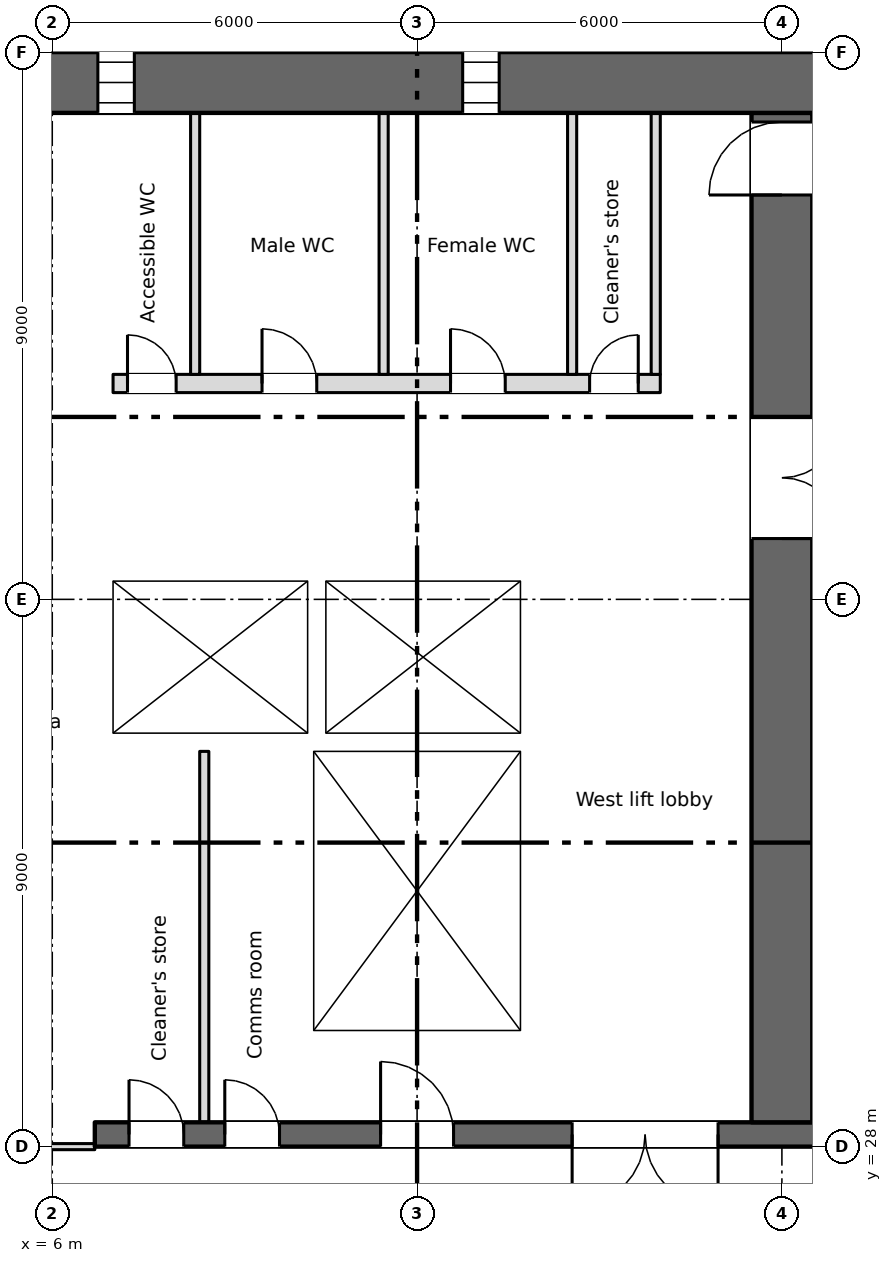
"""IFC4 building model, lengths in metres.
Left out: names, types, materials, properties, quantities, classifications, styles, units other than length and angle.
Written with IfcOpenShell. Run it as: python <this file> out.ifc"""

import sys

from ifc_helpers import new_model, si_unit, direction, frame, frame_2d, origin, place, context, subcontext, project, spatial, rectangle, extrude, element, fill, save


model = new_model("IFC4")
c1 = context("Model", 3, precision=1e-05, world=origin(), true_north=direction((0.0, 1.0)))
c2 = subcontext(c1, "Body", "Model", "MODEL_VIEW")
j1 = project(units=[si_unit("LENGTHUNIT", "METRE"), si_unit("PLANEANGLEUNIT", "RADIAN")], contexts=[c1])
p1 = place(None, origin())
s1 = spatial("IfcSite", under=j1, at=p1, CompositionType="ELEMENT")
p2 = place(p1, origin())
s2 = spatial("IfcBuilding", under=s1, at=p2, CompositionType="ELEMENT")
p3 = place(p2, frame((0.0, 0.0, 67.5)))
s3 = spatial("IfcBuildingStorey", under=s2, at=p3, CompositionType="ELEMENT", Elevation=67.5)
p4 = place(p3, frame((5.55, 45.5, 0.0), z_axis=(0.0, 0.0, 1.0), x_axis=(1.0, 0.0, 0.0)))
e1 = element("IfcWall", 1, at=p4, inside=s3, PredefinedType="SHEAR", context=c2, shape_type="SweptSolid", body=[
    extrude(rectangle(XDim=66.9, YDim=1.0, at=frame_2d((33.45, 0.0))), origin(), (0.0, 0.0, 1.0), 3.35),
])
p5 = place(p4, frame((1.2, 0.0, 0.6)))
e2 = element("IfcOpeningElement", 2, at=p5, cuts=e1, PredefinedType="OPENING", context=c2, shape_type="SweptSolid", body=[
    extrude(rectangle(XDim=0.6, YDim=2.4, at=frame_2d((0.3, 1.2))), frame((0.0, 0.51, 0.0), z_axis=(0.0, -1.0, 0.0), x_axis=(1.0, 0.0, 0.0)), (0.0, 0.0, 1.0), 1.02),
])
p6 = place(p4, frame((7.2, 0.0, 0.6)))
e3 = element("IfcOpeningElement", 3, at=p6, cuts=e1, PredefinedType="OPENING", context=c2, shape_type="SweptSolid", body=[
    extrude(rectangle(XDim=0.6, YDim=2.4, at=frame_2d((0.3, 1.2))), frame((0.0, 0.51, 0.0), z_axis=(0.0, -1.0, 0.0), x_axis=(1.0, 0.0, 0.0)), (0.0, 0.0, 1.0), 1.02),
])
p7 = place(p4, frame((61.2, 0.0, 0.6)))
e4 = element("IfcOpeningElement", 4, at=p7, cuts=e1, PredefinedType="OPENING", context=c2, shape_type="SweptSolid", body=[
    extrude(rectangle(XDim=0.6, YDim=2.4, at=frame_2d((0.3, 1.2))), frame((0.0, 0.51, 0.0), z_axis=(0.0, -1.0, 0.0), x_axis=(1.0, 0.0, 0.0)), (0.0, 0.0, 1.0), 1.02),
])
p8 = place(p3, frame((6.7, 28.2, 0.0), z_axis=(0.0, 0.0, 1.0), x_axis=(1.0, 0.0, 0.0)))
e5 = element("IfcWall", 5, at=p8, inside=s3, PredefinedType="SHEAR", context=c2, shape_type="SweptSolid", body=[
    extrude(rectangle(XDim=57.8, YDim=0.4, at=frame_2d((28.9, 0.0))), origin(), (0.0, 0.0, 1.0), 3.35),
])
p9 = place(p8, frame((12.562, 0.0, 0.0)))
e6 = element("IfcOpeningElement", 6, at=p9, cuts=e5, PredefinedType="OPENING", context=c2, shape_type="SweptSolid", body=[
    extrude(rectangle(XDim=0.9, YDim=2.1, at=frame_2d((0.45, 1.05))), frame((0.0, 0.21, 0.0), z_axis=(0.0, -1.0, 0.0), x_axis=(1.0, 0.0, 0.0)), (0.0, 0.0, 1.0), 0.42),
])
p10 = place(p8, frame((15.137, 0.0, 0.0)))
e7 = element("IfcOpeningElement", 7, at=p10, cuts=e5, PredefinedType="OPENING", context=c2, shape_type="SweptSolid", body=[
    extrude(rectangle(XDim=0.9, YDim=2.1, at=frame_2d((0.45, 1.05))), frame((0.0, 0.21, 0.0), z_axis=(0.0, -1.0, 0.0), x_axis=(1.0, 0.0, 0.0)), (0.0, 0.0, 1.0), 0.42),
])
p11 = place(p8, frame((49.85, 0.0, 0.0)))
e8 = element("IfcOpeningElement", 8, at=p11, cuts=e5, PredefinedType="OPENING", context=c2, shape_type="SweptSolid", body=[
    extrude(rectangle(XDim=0.9, YDim=2.1, at=frame_2d((0.45, 1.05))), frame((0.0, 0.21, 0.0), z_axis=(0.0, -1.0, 0.0), x_axis=(1.0, 0.0, 0.0)), (0.0, 0.0, 1.0), 0.42),
])
p12 = place(p8, frame((0.562, 0.0, 0.0)))
e9 = element("IfcOpeningElement", 9, at=p12, cuts=e5, PredefinedType="OPENING", context=c2, shape_type="SweptSolid", body=[
    extrude(rectangle(XDim=0.9, YDim=2.1, at=frame_2d((0.45, 1.05))), frame((0.0, 0.21, 0.0), z_axis=(0.0, -1.0, 0.0), x_axis=(1.0, 0.0, 0.0)), (0.0, 0.0, 1.0), 0.42),
])
p13 = place(p8, frame((2.137, 0.0, 0.0)))
e10 = element("IfcOpeningElement", 10, at=p13, cuts=e5, PredefinedType="OPENING", context=c2, shape_type="SweptSolid", body=[
    extrude(rectangle(XDim=0.9, YDim=2.1, at=frame_2d((0.45, 1.05))), frame((0.0, 0.21, 0.0), z_axis=(0.0, -1.0, 0.0), x_axis=(1.0, 0.0, 0.0)), (0.0, 0.0, 1.0), 0.42),
])
p14 = place(p8, frame((4.7, 0.0, 0.0)))
e11 = element("IfcOpeningElement", 11, at=p14, cuts=e5, PredefinedType="OPENING", context=c2, shape_type="SweptSolid", body=[
    extrude(rectangle(XDim=1.2, YDim=2.1, at=frame_2d((0.6, 1.05))), frame((0.0, 0.21, 0.0), z_axis=(0.0, -1.0, 0.0), x_axis=(1.0, 0.0, 0.0)), (0.0, 0.0, 1.0), 0.42),
])
p15 = place(p8, frame((31.7, 0.0, 0.0)))
e12 = element("IfcOpeningElement", 12, at=p15, cuts=e5, PredefinedType="OPENING", context=c2, shape_type="SweptSolid", body=[
    extrude(rectangle(XDim=1.2, YDim=2.1, at=frame_2d((0.6, 1.05))), frame((0.0, 0.21, 0.0), z_axis=(0.0, -1.0, 0.0), x_axis=(1.0, 0.0, 0.0)), (0.0, 0.0, 1.0), 0.42),
])
p16 = place(p8, frame((55.2, 0.0, 0.0)))
e13 = element("IfcOpeningElement", 13, at=p16, cuts=e5, PredefinedType="OPENING", context=c2, shape_type="SweptSolid", body=[
    extrude(rectangle(XDim=1.2, YDim=2.1, at=frame_2d((0.6, 1.05))), frame((0.0, 0.21, 0.0), z_axis=(0.0, -1.0, 0.0), x_axis=(1.0, 0.0, 0.0)), (0.0, 0.0, 1.0), 0.42),
])
p17 = place(p8, frame((21.7, 0.0, 0.0)))
e14 = element("IfcOpeningElement", 14, at=p17, cuts=e5, PredefinedType="OPENING", context=c2, shape_type="SweptSolid", body=[
    extrude(rectangle(XDim=1.2, YDim=2.1, at=frame_2d((0.6, 1.05))), frame((0.0, 0.21, 0.0), z_axis=(0.0, -1.0, 0.0), x_axis=(1.0, 0.0, 0.0)), (0.0, 0.0, 1.0), 0.42),
])
p18 = place(p8, frame((41.7, 0.0, 0.0)))
e15 = element("IfcOpeningElement", 15, at=p18, cuts=e5, PredefinedType="OPENING", context=c2, shape_type="SweptSolid", body=[
    extrude(rectangle(XDim=1.2, YDim=2.1, at=frame_2d((0.6, 1.05))), frame((0.0, 0.21, 0.0), z_axis=(0.0, -1.0, 0.0), x_axis=(1.0, 0.0, 0.0)), (0.0, 0.0, 1.0), 0.42),
])
p19 = place(p8, frame((24.85, 0.0, 0.0)))
e16 = element("IfcOpeningElement", 16, at=p19, cuts=e5, PredefinedType="OPENING", context=c2, shape_type="SweptSolid", body=[
    extrude(rectangle(XDim=2.4, YDim=2.1, at=frame_2d((1.2, 1.05))), frame((0.0, 0.21, 0.0), z_axis=(0.0, -1.0, 0.0), x_axis=(1.0, 0.0, 0.0)), (0.0, 0.0, 1.0), 0.42),
])
p20 = place(p8, frame((37.35, 0.0, 0.0)))
e17 = element("IfcOpeningElement", 17, at=p20, cuts=e5, PredefinedType="OPENING", context=c2, shape_type="SweptSolid", body=[
    extrude(rectangle(XDim=2.4, YDim=2.1, at=frame_2d((1.2, 1.05))), frame((0.0, 0.21, 0.0), z_axis=(0.0, -1.0, 0.0), x_axis=(1.0, 0.0, 0.0)), (0.0, 0.0, 1.0), 0.42),
])
p21 = place(p8, frame((7.85, 0.0, 0.0)))
e18 = element("IfcOpeningElement", 18, at=p21, cuts=e5, PredefinedType="OPENING", context=c2, shape_type="SweptSolid", body=[
    extrude(rectangle(XDim=2.4, YDim=2.1, at=frame_2d((1.2, 1.05))), frame((0.0, 0.21, 0.0), z_axis=(0.0, -1.0, 0.0), x_axis=(1.0, 0.0, 0.0)), (0.0, 0.0, 1.0), 0.42),
])
p22 = place(p8, frame((28.85, 0.0, 0.0)))
e19 = element("IfcOpeningElement", 19, at=p22, cuts=e5, PredefinedType="OPENING", context=c2, shape_type="SweptSolid", body=[
    extrude(rectangle(XDim=0.9, YDim=2.1, at=frame_2d((0.45, 1.05))), frame((0.0, 0.21, 0.0), z_axis=(0.0, -1.0, 0.0), x_axis=(1.0, 0.0, 0.0)), (0.0, 0.0, 1.0), 0.42),
])
p23 = place(p8, frame((34.85, 0.0, 0.0)))
e20 = element("IfcOpeningElement", 20, at=p23, cuts=e5, PredefinedType="OPENING", context=c2, shape_type="SweptSolid", body=[
    extrude(rectangle(XDim=0.9, YDim=2.1, at=frame_2d((0.45, 1.05))), frame((0.0, 0.21, 0.0), z_axis=(0.0, -1.0, 0.0), x_axis=(1.0, 0.0, 0.0)), (0.0, 0.0, 1.0), 0.42),
])
p24 = place(p3, frame((6.85, 28.4, 0.0), z_axis=(0.0, 0.0, 1.0), x_axis=(0.0, 1.0, 0.0)))
e21 = element("IfcWall", 21, at=p24, inside=s3, PredefinedType="SHEAR", context=c2, shape_type="SweptSolid", body=[
    extrude(rectangle(XDim=16.6, YDim=0.3, at=frame_2d((8.3, 0.0))), origin(), (0.0, 0.0, 1.0), 3.35),
])
p25 = place(p3, frame((18.0, 28.4, 0.0), z_axis=(0.0, 0.0, 1.0), x_axis=(0.0, 1.0, 0.0)))
e22 = element("IfcWall", 22, at=p25, inside=s3, PredefinedType="SHEAR", context=c2, shape_type="SweptSolid", body=[
    extrude(rectangle(XDim=16.6, YDim=1.0, at=frame_2d((8.3, 0.0))), origin(), (0.0, 0.0, 1.0), 3.35),
])
p26 = place(p25, frame((9.6, 0.0, 0.0)))
e23 = element("IfcOpeningElement", 23, at=p26, cuts=e22, PredefinedType="OPENING", context=c2, shape_type="SweptSolid", body=[
    extrude(rectangle(XDim=2.0, YDim=2.1, at=frame_2d((1.0, 1.05))), frame((0.0, 0.51, 0.0), z_axis=(0.0, -1.0, 0.0), x_axis=(1.0, 0.0, 0.0)), (0.0, 0.0, 1.0), 1.02),
])
p27 = place(p25, frame((15.25, 0.0, 0.0)))
e24 = element("IfcOpeningElement", 24, at=p27, cuts=e22, PredefinedType="OPENING", context=c2, shape_type="SweptSolid", body=[
    extrude(rectangle(XDim=1.2, YDim=2.1, at=frame_2d((0.6, 1.05))), frame((0.0, 0.51, 0.0), z_axis=(0.0, -1.0, 0.0), x_axis=(1.0, 0.0, 0.0)), (0.0, 0.0, 1.0), 1.02),
])
for number, where, z_axis, x_axis in (
    (25, (10.15, 28.4, 0.0), (0.0, 0.0, 1.0), (0.0, 1.0, 0.0)),
    (26, (13.85, 28.4, 0.0), (0.0, 0.0, 1.0), (0.0, 1.0, 0.0)),
):
    element("IfcWall", number, at=place(p3, frame(where, z_axis=z_axis, x_axis=x_axis)), inside=s3, PredefinedType="SHEAR", context=c2, shape_type="SweptSolid", body=[
        extrude(rectangle(XDim=6.1, YDim=0.3, at=frame_2d((3.05, 0.0))), origin(), (0.0, 0.0, 1.0), 3.35),
    ])
for number, where, z_axis, x_axis in (
    (27, (7.0, 34.65, 0.0), (0.0, 0.0, 1.0), (1.0, 0.0, 0.0)),
    (28, (7.0, 37.45, 0.0), (0.0, 0.0, 1.0), (1.0, 0.0, 0.0)),
):
    element("IfcWall", number, at=place(p3, frame(where, z_axis=z_axis, x_axis=x_axis)), inside=s3, PredefinedType="SHEAR", context=c2, shape_type="SweptSolid", body=[
        extrude(rectangle(XDim=7.0, YDim=0.3, at=frame_2d((3.5, 0.0))), origin(), (0.0, 0.0, 1.0), 3.35),
    ])
p28 = place(p3, frame((13.85, 34.8, 0.0), z_axis=(0.0, 0.0, 1.0), x_axis=(0.0, 1.0, 0.0)))
e29 = element("IfcWall", 29, at=p28, inside=s3, PredefinedType="SHEAR", context=c2, shape_type="SweptSolid", body=[
    extrude(rectangle(XDim=2.5, YDim=0.3, at=frame_2d((1.25, 0.0))), origin(), (0.0, 0.0, 1.0), 3.35),
])
p29 = place(p3, frame((7.0, 40.55, 0.0), z_axis=(0.0, 0.0, 1.0), x_axis=(1.0, 0.0, 0.0)))
e30 = element("IfcWall", 30, at=p29, inside=s3, PredefinedType="PARTITIONING", context=c2, shape_type="SweptSolid", body=[
    extrude(rectangle(XDim=9.0, YDim=0.3, at=frame_2d((4.5, 0.0))), origin(), (0.0, 0.0, 1.0), 3.35),
])
p30 = place(p29, frame((0.238, 0.0, 0.0)))
e31 = element("IfcOpeningElement", 31, at=p30, cuts=e30, PredefinedType="OPENING", context=c2, shape_type="SweptSolid", body=[
    extrude(rectangle(XDim=0.8, YDim=2.1, at=frame_2d((0.4, 1.05))), frame((0.0, 0.16, 0.0), z_axis=(0.0, -1.0, 0.0), x_axis=(1.0, 0.0, 0.0)), (0.0, 0.0, 1.0), 0.32),
])
p31 = place(p29, frame((2.45, 0.0, 0.0)))
e32 = element("IfcOpeningElement", 32, at=p31, cuts=e30, PredefinedType="OPENING", context=c2, shape_type="SweptSolid", body=[
    extrude(rectangle(XDim=0.9, YDim=2.1, at=frame_2d((0.45, 1.05))), frame((0.0, 0.16, 0.0), z_axis=(0.0, -1.0, 0.0), x_axis=(1.0, 0.0, 0.0)), (0.0, 0.0, 1.0), 0.32),
])
p32 = place(p29, frame((5.55, 0.0, 0.0)))
e33 = element("IfcOpeningElement", 33, at=p32, cuts=e30, PredefinedType="OPENING", context=c2, shape_type="SweptSolid", body=[
    extrude(rectangle(XDim=0.9, YDim=2.1, at=frame_2d((0.45, 1.05))), frame((0.0, 0.16, 0.0), z_axis=(0.0, -1.0, 0.0), x_axis=(1.0, 0.0, 0.0)), (0.0, 0.0, 1.0), 0.32),
])
p33 = place(p29, frame((7.837, 0.0, 0.0)))
e34 = element("IfcOpeningElement", 34, at=p33, cuts=e30, PredefinedType="OPENING", context=c2, shape_type="SweptSolid", body=[
    extrude(rectangle(XDim=0.8, YDim=2.1, at=frame_2d((0.4, 1.05))), frame((0.0, 0.16, 0.0), z_axis=(0.0, -1.0, 0.0), x_axis=(1.0, 0.0, 0.0)), (0.0, 0.0, 1.0), 0.32),
])
p34 = place(p3, frame((10.35, 34.8, 0.0), z_axis=(0.0, 0.0, 1.0), x_axis=(0.0, 1.0, 0.0)))
e35 = element("IfcWall", 35, at=p34, inside=s3, PredefinedType="SHEAR", context=c2, shape_type="SweptSolid", body=[
    extrude(rectangle(XDim=2.5, YDim=0.3, at=frame_2d((1.25, 0.0))), origin(), (0.0, 0.0, 1.0), 3.35),
])
p35 = place(p3, frame((15.925, 40.7, 0.0), z_axis=(0.0, 0.0, 1.0), x_axis=(0.0, 1.0, 0.0)))
e36 = element("IfcWall", 36, at=p35, inside=s3, PredefinedType="PARTITIONING", context=c2, shape_type="SweptSolid", body=[
    extrude(rectangle(XDim=4.3, YDim=0.15, at=frame_2d((2.15, 0.0))), origin(), (0.0, 0.0, 1.0), 3.35),
])
p36 = place(p3, frame((8.5, 28.4, 0.0), z_axis=(0.0, 0.0, 1.0), x_axis=(0.0, 1.0, 0.0)))
e37 = element("IfcWall", 37, at=p36, inside=s3, PredefinedType="PARTITIONING", context=c2, shape_type="SweptSolid", body=[
    extrude(rectangle(XDim=6.1, YDim=0.15, at=frame_2d((3.05, 0.0))), origin(), (0.0, 0.0, 1.0), 3.35),
])
for number, where, z_axis, x_axis in (
    (38, (8.35, 40.7, 0.0), (0.0, 0.0, 1.0), (0.0, 1.0, 0.0)),
    (39, (11.45, 40.7, 0.0), (0.0, 0.0, 1.0), (0.0, 1.0, 0.0)),
    (40, (14.55, 40.7, 0.0), (0.0, 0.0, 1.0), (0.0, 1.0, 0.0)),
):
    element("IfcWall", number, at=place(p3, frame(where, z_axis=z_axis, x_axis=x_axis)), inside=s3, PredefinedType="PARTITIONING", context=c2, shape_type="SweptSolid", body=[
        extrude(rectangle(XDim=4.3, YDim=0.15, at=frame_2d((2.15, 0.0))), origin(), (0.0, 0.0, 1.0), 3.35),
    ])
p37 = place(p3, frame((0.8, 28.0, 0.0), z_axis=(0.0, 0.0, 1.0), x_axis=(1.0, 0.0, 0.0)))
e41 = element("IfcWall", 41, at=p37, inside=s3, PredefinedType="PARTITIONING", context=c2, shape_type="SweptSolid", body=[
    extrude(rectangle(XDim=5.9, YDim=0.1, at=frame_2d((2.95, 0.0))), origin(), (0.0, 0.0, 1.0), 3.35),
])
p38 = place(p37, frame((2.05, 0.0, 0.0)))
e42 = element("IfcOpeningElement", 42, at=p38, cuts=e41, PredefinedType="OPENING", context=c2, shape_type="SweptSolid", body=[
    extrude(rectangle(XDim=1.8, YDim=2.1, at=frame_2d((0.9, 1.05))), frame((0.0, 0.06, 0.0), z_axis=(0.0, -1.0, 0.0), x_axis=(1.0, 0.0, 0.0)), (0.0, 0.0, 1.0), 0.12),
])
p39 = place(p5, origin())
e43 = element("IfcWindow", 43, at=p39, inside=s3, PartitioningType="SINGLE_PANEL", PredefinedType="WINDOW", context=c2, shape_type="SweptSolid", body=[
    extrude(rectangle(XDim=0.6, YDim=2.4, at=frame_2d((0.3, 1.2))), frame((0.0, 0.03, 0.0), z_axis=(0.0, -1.0, 0.0), x_axis=(1.0, 0.0, 0.0)), (0.0, 0.0, 1.0), 0.06),
])
fill(e2, e43)
p40 = place(p6, origin())
e44 = element("IfcWindow", 44, at=p40, inside=s3, PartitioningType="SINGLE_PANEL", PredefinedType="WINDOW", context=c2, shape_type="SweptSolid", body=[
    extrude(rectangle(XDim=0.6, YDim=2.4, at=frame_2d((0.3, 1.2))), frame((0.0, 0.03, 0.0), z_axis=(0.0, -1.0, 0.0), x_axis=(1.0, 0.0, 0.0)), (0.0, 0.0, 1.0), 0.06),
])
fill(e3, e44)
p41 = place(p12, origin())
e45 = element("IfcDoor", 45, at=p41, inside=s3, OperationType="SINGLE_SWING_LEFT", PredefinedType="DOOR", context=c2, shape_type="SweptSolid", body=[
    extrude(rectangle(XDim=0.9, YDim=2.1, at=frame_2d((0.45, 1.05))), frame((0.0, 0.025, 0.0), z_axis=(0.0, -1.0, 0.0), x_axis=(1.0, 0.0, 0.0)), (0.0, 0.0, 1.0), 0.05),
])
fill(e9, e45)
p42 = place(p13, origin())
e46 = element("IfcDoor", 46, at=p42, inside=s3, OperationType="SINGLE_SWING_LEFT", PredefinedType="DOOR", context=c2, shape_type="SweptSolid", body=[
    extrude(rectangle(XDim=0.9, YDim=2.1, at=frame_2d((0.45, 1.05))), frame((0.0, 0.025, 0.0), z_axis=(0.0, -1.0, 0.0), x_axis=(1.0, 0.0, 0.0)), (0.0, 0.0, 1.0), 0.05),
])
fill(e10, e46)
p43 = place(p30, origin())
e47 = element("IfcDoor", 47, at=p43, inside=s3, OperationType="SINGLE_SWING_LEFT", PredefinedType="DOOR", context=c2, shape_type="SweptSolid", body=[
    extrude(rectangle(XDim=0.8, YDim=2.1, at=frame_2d((0.4, 1.05))), frame((0.0, 0.025, 0.0), z_axis=(0.0, -1.0, 0.0), x_axis=(1.0, 0.0, 0.0)), (0.0, 0.0, 1.0), 0.05),
])
fill(e31, e47)
p44 = place(p31, origin())
e48 = element("IfcDoor", 48, at=p44, inside=s3, OperationType="SINGLE_SWING_LEFT", PredefinedType="DOOR", context=c2, shape_type="SweptSolid", body=[
    extrude(rectangle(XDim=0.9, YDim=2.1, at=frame_2d((0.45, 1.05))), frame((0.0, 0.025, 0.0), z_axis=(0.0, -1.0, 0.0), x_axis=(1.0, 0.0, 0.0)), (0.0, 0.0, 1.0), 0.05),
])
fill(e32, e48)
p45 = place(p32, origin())
e49 = element("IfcDoor", 49, at=p45, inside=s3, OperationType="SINGLE_SWING_LEFT", PredefinedType="DOOR", context=c2, shape_type="SweptSolid", body=[
    extrude(rectangle(XDim=0.9, YDim=2.1, at=frame_2d((0.45, 1.05))), frame((0.0, 0.025, 0.0), z_axis=(0.0, -1.0, 0.0), x_axis=(1.0, 0.0, 0.0)), (0.0, 0.0, 1.0), 0.05),
])
fill(e33, e49)
p46 = place(p33, origin())
e50 = element("IfcDoor", 50, at=p46, inside=s3, OperationType="SINGLE_SWING_RIGHT", PredefinedType="DOOR", context=c2, shape_type="SweptSolid", body=[
    extrude(rectangle(XDim=0.8, YDim=2.1, at=frame_2d((0.4, 1.05))), frame((0.0, 0.025, 0.0), z_axis=(0.0, -1.0, 0.0), x_axis=(1.0, 0.0, 0.0)), (0.0, 0.0, 1.0), 0.05),
])
fill(e34, e50)
p47 = place(p14, origin())
e51 = element("IfcDoor", 51, at=p47, inside=s3, OperationType="SINGLE_SWING_LEFT", PredefinedType="DOOR", context=c2, shape_type="SweptSolid", body=[
    extrude(rectangle(XDim=1.2, YDim=2.1, at=frame_2d((0.6, 1.05))), frame((0.0, 0.025, 0.0), z_axis=(0.0, -1.0, 0.0), x_axis=(1.0, 0.0, 0.0)), (0.0, 0.0, 1.0), 0.05),
])
fill(e11, e51)
p48 = place(p21, origin())
e52 = element("IfcDoor", 52, at=p48, inside=s3, OperationType="DOUBLE_DOOR_SINGLE_SWING", PredefinedType="DOOR", context=c2, shape_type="SweptSolid", body=[
    extrude(rectangle(XDim=2.4, YDim=2.1, at=frame_2d((1.2, 1.05))), frame((0.0, 0.025, 0.0), z_axis=(0.0, -1.0, 0.0), x_axis=(1.0, 0.0, 0.0)), (0.0, 0.0, 1.0), 0.05),
])
fill(e18, e52)
p49 = place(p26, origin())
e53 = element("IfcDoor", 53, at=p49, inside=s3, OperationType="DOUBLE_DOOR_SINGLE_SWING", PredefinedType="DOOR", context=c2, shape_type="SweptSolid", body=[
    extrude(rectangle(XDim=2.0, YDim=2.1, at=frame_2d((1.0, 1.05))), frame((0.0, 0.025, 0.0), z_axis=(0.0, -1.0, 0.0), x_axis=(1.0, 0.0, 0.0)), (0.0, 0.0, 1.0), 0.05),
])
fill(e23, e53)
p50 = place(p27, origin())
e54 = element("IfcDoor", 54, at=p50, inside=s3, OperationType="SINGLE_SWING_LEFT", PredefinedType="DOOR", context=c2, shape_type="SweptSolid", body=[
    extrude(rectangle(XDim=1.2, YDim=2.1, at=frame_2d((0.6, 1.05))), frame((0.0, 0.025, 0.0), z_axis=(0.0, -1.0, 0.0), x_axis=(1.0, 0.0, 0.0)), (0.0, 0.0, 1.0), 0.05),
])
fill(e24, e54)
save(model, sys.argv[1])
